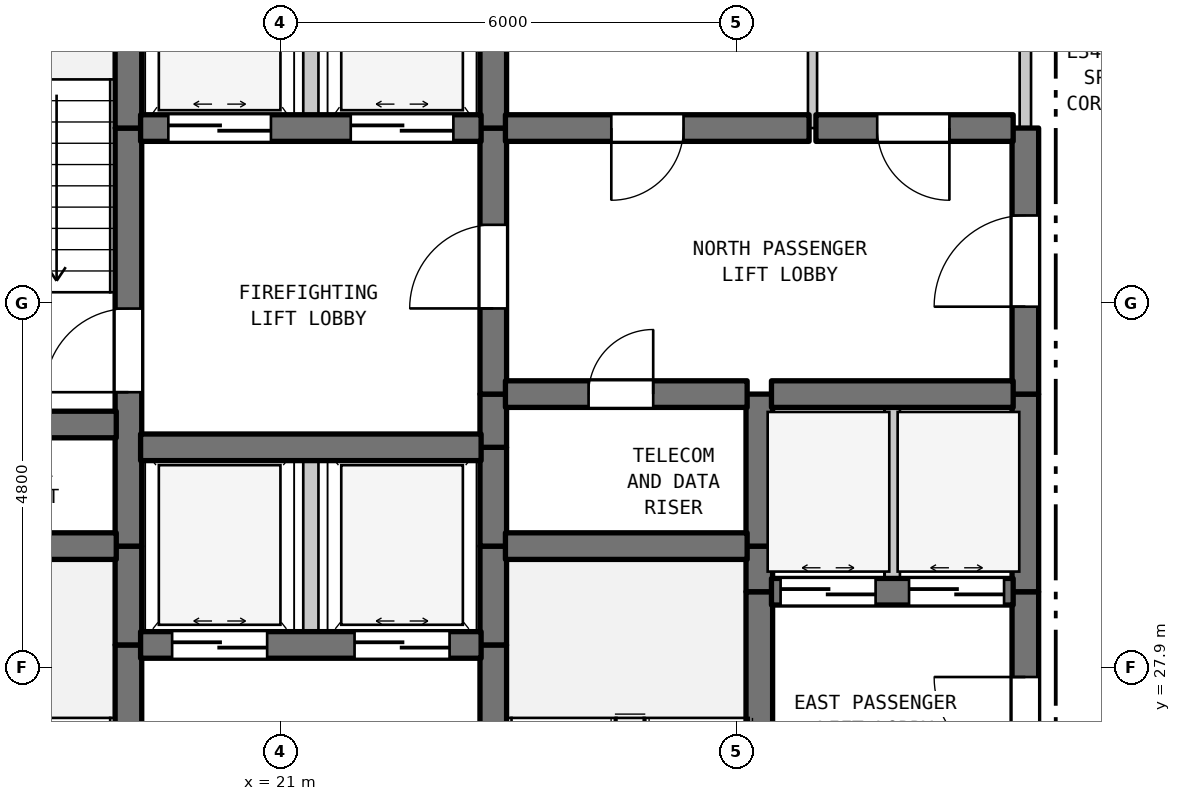
"""IFC4 building model, lengths in metres.
Left out: names, types, materials, properties, quantities, classifications, styles, units other than length and angle.
Written with IfcOpenShell. Run it as: python <this file> out.ifc"""

import sys

from ifc_helpers import new_model, si_unit, direction, frame, frame_2d, origin, place, context, subcontext, project, spatial, rectangle, extrude, element, fill, save


model = new_model("IFC4")
c1 = context("Model", 3, precision=1e-05, world=origin(), true_north=direction((0.0, 1.0)))
c2 = subcontext(c1, "Body", "Model", "MODEL_VIEW")
j1 = project(units=[si_unit("LENGTHUNIT", "METRE"), si_unit("PLANEANGLEUNIT", "RADIAN")], contexts=[c1])
p1 = place(None, origin())
s1 = spatial("IfcSite", under=j1, at=p1, CompositionType="ELEMENT")
p2 = place(p1, origin())
s2 = spatial("IfcBuilding", under=s1, at=p2, CompositionType="ELEMENT")
p3 = place(p2, frame((0.0, 0.0, 140.9)))
s3 = spatial("IfcBuildingStorey", under=s2, at=p3, CompositionType="ELEMENT", Elevation=140.9)
p4 = place(p3, frame((19.0, 22.7, 0.0), z_axis=(0.0, 0.0, 1.0), x_axis=(0.0, 1.0, 0.0)))
e1 = element("IfcWall", 1, at=p4, inside=s3, PredefinedType="SHEAR", context=c2, shape_type="SweptSolid", body=[
    extrude(rectangle(XDim=5.5, YDim=0.35, at=frame_2d((2.75, 0.0))), origin(), (0.0, 0.0, 1.0), 3.385),
])
p5 = place(p4, frame((0.631, 0.0, 0.0)))
e2 = element("IfcOpeningElement", 2, at=p5, cuts=e1, PredefinedType="OPENING", context=c2, shape_type="SweptSolid", body=[
    extrude(rectangle(XDim=1.1, YDim=2.15, at=frame_2d((0.55, 1.075))), frame((0.0, 0.185, 0.0), z_axis=(0.0, -1.0, 0.0), x_axis=(1.0, 0.0, 0.0)), (0.0, 0.0, 1.0), 0.37),
])
p6 = place(p3, frame((19.0, 28.2, 0.0), z_axis=(0.0, 0.0, 1.0), x_axis=(0.0, 1.0, 0.0)))
e3 = element("IfcWall", 3, at=p6, inside=s3, PredefinedType="SHEAR", context=c2, shape_type="SweptSolid", body=[
    extrude(rectangle(XDim=1.3, YDim=0.35, at=frame_2d((0.65, 0.0))), origin(), (0.0, 0.0, 1.0), 3.385),
])
p7 = place(p3, frame((19.0, 29.5, 0.0), z_axis=(0.0, 0.0, 1.0), x_axis=(0.0, 1.0, 0.0)))
e4 = element("IfcWall", 4, at=p7, inside=s3, PredefinedType="SHEAR", context=c2, shape_type="SweptSolid", body=[
    extrude(rectangle(XDim=5.5, YDim=0.35, at=frame_2d((2.75, 0.0))), origin(), (0.0, 0.0, 1.0), 3.385),
])
p8 = place(p7, frame((2.025, 0.0, 0.0)))
e5 = element("IfcOpeningElement", 5, at=p8, cuts=e4, PredefinedType="OPENING", context=c2, shape_type="SweptSolid", body=[
    extrude(rectangle(XDim=1.1, YDim=2.15, at=frame_2d((0.55, 1.075))), frame((0.0, 0.185, 0.0), z_axis=(0.0, -1.0, 0.0), x_axis=(1.0, 0.0, 0.0)), (0.0, 0.0, 1.0), 0.37),
])
p9 = place(p3, frame((19.0, 35.0, 0.0), z_axis=(0.0, 0.0, 1.0), x_axis=(0.0, 1.0, 0.0)))
e6 = element("IfcWall", 6, at=p9, inside=s3, PredefinedType="SHEAR", context=c2, shape_type="SweptSolid", body=[
    extrude(rectangle(XDim=2.9, YDim=0.35, at=frame_2d((1.45, 0.0))), origin(), (0.0, 0.0, 1.0), 3.385),
])
p10 = place(p3, frame((21.4, 28.2, 0.0), z_axis=(0.0, 0.0, 1.0), x_axis=(0.0, 1.0, 0.0)))
e7 = element("IfcWall", 7, at=p10, inside=s3, PredefinedType="STANDARD", context=c2, shape_type="SweptSolid", body=[
    extrude(rectangle(XDim=2.6, YDim=0.2, at=frame_2d((1.3, 0.0))), origin(), (0.0, 0.0, 1.0), 3.385),
])
p11 = place(p3, frame((21.4, 35.0, 0.0), z_axis=(0.0, 0.0, 1.0), x_axis=(0.0, 1.0, 0.0)))
e8 = element("IfcWall", 8, at=p11, inside=s3, PredefinedType="STANDARD", context=c2, shape_type="SweptSolid", body=[
    extrude(rectangle(XDim=2.9, YDim=0.2, at=frame_2d((1.45, 0.0))), origin(), (0.0, 0.0, 1.0), 3.385),
])
p12 = place(p3, frame((23.8, 22.7, 0.0), z_axis=(0.0, 0.0, 1.0), x_axis=(0.0, 1.0, 0.0)))
e9 = element("IfcWall", 9, at=p12, inside=s3, PredefinedType="SHEAR", context=c2, shape_type="SweptSolid", body=[
    extrude(rectangle(XDim=5.5, YDim=0.35, at=frame_2d((2.75, 0.0))), origin(), (0.0, 0.0, 1.0), 3.385),
])
p13 = place(p12, frame((0.235, 0.0, 0.0)))
e10 = element("IfcOpeningElement", 10, at=p13, cuts=e9, PredefinedType="OPENING", context=c2, shape_type="SweptSolid", body=[
    extrude(rectangle(XDim=1.1, YDim=2.15, at=frame_2d((0.55, 1.075))), frame((0.0, 0.185, 0.0), z_axis=(0.0, -1.0, 0.0), x_axis=(1.0, 0.0, 0.0)), (0.0, 0.0, 1.0), 0.37),
])
for number, where, z_axis, x_axis in (
    (11, (23.8, 28.2, 0.0), (0.0, 0.0, 1.0), (0.0, 1.0, 0.0)),
    (12, (23.8, 29.5, 0.0), (0.0, 0.0, 1.0), (0.0, 1.0, 0.0)),
):
    element("IfcWall", number, at=place(p3, frame(where, z_axis=z_axis, x_axis=x_axis)), inside=s3, PredefinedType="SHEAR", context=c2, shape_type="SweptSolid", body=[
        extrude(rectangle(XDim=1.3, YDim=0.35, at=frame_2d((0.65, 0.0))), origin(), (0.0, 0.0, 1.0), 3.385),
    ])
p14 = place(p3, frame((23.8, 30.8, 0.0), z_axis=(0.0, 0.0, 1.0), x_axis=(0.0, 1.0, 0.0)))
e13 = element("IfcWall", 13, at=p14, inside=s3, PredefinedType="SHEAR", context=c2, shape_type="SweptSolid", body=[
    extrude(rectangle(XDim=0.7, YDim=0.35, at=frame_2d((0.35, 0.0))), origin(), (0.0, 0.0, 1.0), 3.385),
])
p15 = place(p3, frame((23.8, 31.5, 0.0), z_axis=(0.0, 0.0, 1.0), x_axis=(0.0, 1.0, 0.0)))
e14 = element("IfcWall", 14, at=p15, inside=s3, PredefinedType="SHEAR", context=c2, shape_type="SweptSolid", body=[
    extrude(rectangle(XDim=3.5, YDim=0.35, at=frame_2d((1.75, 0.0))), origin(), (0.0, 0.0, 1.0), 3.385),
])
p16 = place(p15, frame((1.127, 0.0, 0.0)))
e15 = element("IfcOpeningElement", 15, at=p16, cuts=e14, PredefinedType="OPENING", context=c2, shape_type="SweptSolid", body=[
    extrude(rectangle(XDim=1.1, YDim=2.15, at=frame_2d((0.55, 1.075))), frame((0.0, 0.185, 0.0), z_axis=(0.0, -1.0, 0.0), x_axis=(1.0, 0.0, 0.0)), (0.0, 0.0, 1.0), 0.37),
])
p17 = place(p3, frame((23.8, 35.0, 0.0), z_axis=(0.0, 0.0, 1.0), x_axis=(0.0, 1.0, 0.0)))
e16 = element("IfcWall", 16, at=p17, inside=s3, PredefinedType="SHEAR", context=c2, shape_type="SweptSolid", body=[
    extrude(rectangle(XDim=2.9, YDim=0.35, at=frame_2d((1.45, 0.0))), origin(), (0.0, 0.0, 1.0), 3.385),
])
p18 = place(p3, frame((27.3, 25.6, 0.0), z_axis=(0.0, 0.0, 1.0), x_axis=(0.0, 1.0, 0.0)))
e17 = element("IfcWall", 17, at=p18, inside=s3, PredefinedType="SHEAR", context=c2, shape_type="SweptSolid", body=[
    extrude(rectangle(XDim=3.3, YDim=0.35, at=frame_2d((1.65, 0.0))), origin(), (0.0, 0.0, 1.0), 3.385),
])
p19 = place(p3, frame((27.3, 28.9, 0.0), z_axis=(0.0, 0.0, 1.0), x_axis=(0.0, 1.0, 0.0)))
e18 = element("IfcWall", 18, at=p19, inside=s3, PredefinedType="SHEAR", context=c2, shape_type="SweptSolid", body=[
    extrude(rectangle(XDim=0.6, YDim=0.35, at=frame_2d((0.3, 0.0))), origin(), (0.0, 0.0, 1.0), 3.385),
])
p20 = place(p3, frame((27.3, 29.5, 0.0), z_axis=(0.0, 0.0, 1.0), x_axis=(0.0, 1.0, 0.0)))
e19 = element("IfcWall", 19, at=p20, inside=s3, PredefinedType="SHEAR", context=c2, shape_type="SweptSolid", body=[
    extrude(rectangle(XDim=2.0, YDim=0.35, at=frame_2d((1.0, 0.0))), origin(), (0.0, 0.0, 1.0), 3.385),
])
p21 = place(p3, frame((28.0, 35.0, 0.0), z_axis=(0.0, 0.0, 1.0), x_axis=(0.0, 1.0, 0.0)))
e20 = element("IfcWall", 20, at=p21, inside=s3, PredefinedType="PARTITIONING", context=c2, shape_type="SweptSolid", body=[
    extrude(rectangle(XDim=2.9, YDim=0.12, at=frame_2d((1.45, 0.0))), origin(), (0.0, 0.0, 1.0), 3.385),
])
p22 = place(p3, frame((29.05, 28.9, 0.0), z_axis=(0.0, 0.0, 1.0), x_axis=(0.0, 1.0, 0.0)))
e21 = element("IfcWall", 21, at=p22, inside=s3, PredefinedType="STANDARD", context=c2, shape_type="SweptSolid", body=[
    extrude(rectangle(XDim=2.6, YDim=0.2, at=frame_2d((1.3, 0.0))), origin(), (0.0, 0.0, 1.0), 3.385),
])
p23 = place(p3, frame((30.8, 25.6, 0.0), z_axis=(0.0, 0.0, 1.0), x_axis=(0.0, 1.0, 0.0)))
e22 = element("IfcWall", 22, at=p23, inside=s3, PredefinedType="SHEAR", context=c2, shape_type="SweptSolid", body=[
    extrude(rectangle(XDim=3.3, YDim=0.35, at=frame_2d((1.65, 0.0))), origin(), (0.0, 0.0, 1.0), 3.385),
])
p24 = place(p23, frame((0.978, 0.0, 0.0)))
e23 = element("IfcOpeningElement", 23, at=p24, cuts=e22, PredefinedType="OPENING", context=c2, shape_type="SweptSolid", body=[
    extrude(rectangle(XDim=1.2, YDim=2.2, at=frame_2d((0.6, 1.1))), frame((0.0, 0.185, 0.0), z_axis=(0.0, -1.0, 0.0), x_axis=(1.0, 0.0, 0.0)), (0.0, 0.0, 1.0), 0.37),
])
p25 = place(p3, frame((30.8, 28.9, 0.0), z_axis=(0.0, 0.0, 1.0), x_axis=(0.0, 1.0, 0.0)))
e24 = element("IfcWall", 24, at=p25, inside=s3, PredefinedType="SHEAR", context=c2, shape_type="SweptSolid", body=[
    extrude(rectangle(XDim=2.6, YDim=0.35, at=frame_2d((1.3, 0.0))), origin(), (0.0, 0.0, 1.0), 3.385),
])
p26 = place(p3, frame((30.8, 31.5, 0.0), z_axis=(0.0, 0.0, 1.0), x_axis=(0.0, 1.0, 0.0)))
e25 = element("IfcWall", 25, at=p26, inside=s3, PredefinedType="SHEAR", context=c2, shape_type="SweptSolid", body=[
    extrude(rectangle(XDim=3.5, YDim=0.35, at=frame_2d((1.75, 0.0))), origin(), (0.0, 0.0, 1.0), 3.385),
])
p27 = place(p26, frame((1.15, 0.0, 0.0)))
e26 = element("IfcOpeningElement", 26, at=p27, cuts=e25, PredefinedType="OPENING", context=c2, shape_type="SweptSolid", body=[
    extrude(rectangle(XDim=1.2, YDim=2.2, at=frame_2d((0.6, 1.1))), frame((0.0, 0.185, 0.0), z_axis=(0.0, -1.0, 0.0), x_axis=(1.0, 0.0, 0.0)), (0.0, 0.0, 1.0), 0.37),
])
p28 = place(p3, frame((30.8, 35.0, 0.0), z_axis=(0.0, 0.0, 1.0), x_axis=(0.0, 1.0, 0.0)))
e27 = element("IfcWall", 27, at=p28, inside=s3, PredefinedType="STANDARD", context=c2, shape_type="SweptSolid", body=[
    extrude(rectangle(XDim=2.9, YDim=0.15, at=frame_2d((1.45, 0.0))), origin(), (0.0, 0.0, 1.0), 3.385),
])
p29 = place(p3, frame((19.16, 28.2, 0.0), z_axis=(0.0, 0.0, 1.0), x_axis=(1.0, 0.0, 0.0)))
e28 = element("IfcWall", 28, at=p29, inside=s3, PredefinedType="SHEAR", context=c2, shape_type="SweptSolid", body=[
    extrude(rectangle(XDim=4.48, YDim=0.35, at=frame_2d((2.24, 0.0))), origin(), (0.0, 0.0, 1.0), 3.385),
])
p30 = place(p29, frame((0.415, 0.0, 0.0)))
e29 = element("IfcOpeningElement", 29, at=p30, cuts=e28, PredefinedType="OPENING", context=c2, shape_type="SweptSolid", body=[
    extrude(rectangle(XDim=1.25, YDim=2.2, at=frame_2d((0.625, 1.1))), frame((0.0, 0.185, 0.0), z_axis=(0.0, -1.0, 0.0), x_axis=(1.0, 0.0, 0.0)), (0.0, 0.0, 1.0), 0.37),
])
p31 = place(p29, frame((2.815, 0.0, 0.0)))
e30 = element("IfcOpeningElement", 30, at=p31, cuts=e28, PredefinedType="OPENING", context=c2, shape_type="SweptSolid", body=[
    extrude(rectangle(XDim=1.25, YDim=2.2, at=frame_2d((0.625, 1.1))), frame((0.0, 0.185, 0.0), z_axis=(0.0, -1.0, 0.0), x_axis=(1.0, 0.0, 0.0)), (0.0, 0.0, 1.0), 0.37),
])
p32 = place(p3, frame((27.46, 28.9, 0.0), z_axis=(0.0, 0.0, 1.0), x_axis=(1.0, 0.0, 0.0)))
e31 = element("IfcWall", 31, at=p32, inside=s3, PredefinedType="SHEAR", context=c2, shape_type="SweptSolid", body=[
    extrude(rectangle(XDim=3.18, YDim=0.35, at=frame_2d((1.59, 0.0))), origin(), (0.0, 0.0, 1.0), 3.385),
])
p33 = place(p32, frame((0.12, 0.0, 0.0)))
e32 = element("IfcOpeningElement", 32, at=p33, cuts=e31, PredefinedType="OPENING", context=c2, shape_type="SweptSolid", body=[
    extrude(rectangle(XDim=1.25, YDim=2.2, at=frame_2d((0.625, 1.1))), frame((0.0, 0.185, 0.0), z_axis=(0.0, -1.0, 0.0), x_axis=(1.0, 0.0, 0.0)), (0.0, 0.0, 1.0), 0.37),
])
p34 = place(p32, frame((1.81, 0.0, 0.0)))
e33 = element("IfcOpeningElement", 33, at=p34, cuts=e31, PredefinedType="OPENING", context=c2, shape_type="SweptSolid", body=[
    extrude(rectangle(XDim=1.25, YDim=2.2, at=frame_2d((0.625, 1.1))), frame((0.0, 0.185, 0.0), z_axis=(0.0, -1.0, 0.0), x_axis=(1.0, 0.0, 0.0)), (0.0, 0.0, 1.0), 0.37),
])
p35 = place(p3, frame((15.16, 29.5, 0.0), z_axis=(0.0, 0.0, 1.0), x_axis=(1.0, 0.0, 0.0)))
e34 = element("IfcWall", 34, at=p35, inside=s3, PredefinedType="SHEAR", context=c2, shape_type="SweptSolid", body=[
    extrude(rectangle(XDim=3.68, YDim=0.35, at=frame_2d((1.84, 0.0))), origin(), (0.0, 0.0, 1.0), 3.385),
])
p36 = place(p3, frame((23.96, 29.5, 0.0), z_axis=(0.0, 0.0, 1.0), x_axis=(1.0, 0.0, 0.0)))
e35 = element("IfcWall", 35, at=p36, inside=s3, PredefinedType="SHEAR", context=c2, shape_type="SweptSolid", body=[
    extrude(rectangle(XDim=3.18, YDim=0.35, at=frame_2d((1.59, 0.0))), origin(), (0.0, 0.0, 1.0), 3.385),
])
p37 = place(p3, frame((19.16, 30.8, 0.0), z_axis=(0.0, 0.0, 1.0), x_axis=(1.0, 0.0, 0.0)))
e36 = element("IfcWall", 36, at=p37, inside=s3, PredefinedType="SHEAR", context=c2, shape_type="SweptSolid", body=[
    extrude(rectangle(XDim=4.48, YDim=0.35, at=frame_2d((2.24, 0.0))), origin(), (0.0, 0.0, 1.0), 3.385),
])
p38 = place(p3, frame((15.16, 31.1, 0.0), z_axis=(0.0, 0.0, 1.0), x_axis=(1.0, 0.0, 0.0)))
e37 = element("IfcWall", 37, at=p38, inside=s3, PredefinedType="SHEAR", context=c2, shape_type="SweptSolid", body=[
    extrude(rectangle(XDim=3.68, YDim=0.35, at=frame_2d((1.84, 0.0))), origin(), (0.0, 0.0, 1.0), 3.385),
])
p39 = place(p3, frame((23.96, 31.5, 0.0), z_axis=(0.0, 0.0, 1.0), x_axis=(1.0, 0.0, 0.0)))
e38 = element("IfcWall", 38, at=p39, inside=s3, PredefinedType="SHEAR", context=c2, shape_type="SweptSolid", body=[
    extrude(rectangle(XDim=3.18, YDim=0.35, at=frame_2d((1.59, 0.0))), origin(), (0.0, 0.0, 1.0), 3.385),
])
p40 = place(p39, frame((1.094, 0.0, 0.0)))
e39 = element("IfcOpeningElement", 39, at=p40, cuts=e38, PredefinedType="OPENING", context=c2, shape_type="SweptSolid", body=[
    extrude(rectangle(XDim=0.85, YDim=2.1, at=frame_2d((0.425, 1.05))), frame((0.0, 0.185, 0.0), z_axis=(0.0, -1.0, 0.0), x_axis=(1.0, 0.0, 0.0)), (0.0, 0.0, 1.0), 0.37),
])
p41 = place(p3, frame((27.46, 31.5, 0.0), z_axis=(0.0, 0.0, 1.0), x_axis=(1.0, 0.0, 0.0)))
e40 = element("IfcWall", 40, at=p41, inside=s3, PredefinedType="SHEAR", context=c2, shape_type="SweptSolid", body=[
    extrude(rectangle(XDim=3.18, YDim=0.35, at=frame_2d((1.59, 0.0))), origin(), (0.0, 0.0, 1.0), 3.385),
])
p42 = place(p3, frame((19.16, 35.0, 0.0), z_axis=(0.0, 0.0, 1.0), x_axis=(1.0, 0.0, 0.0)))
e41 = element("IfcWall", 41, at=p42, inside=s3, PredefinedType="SHEAR", context=c2, shape_type="SweptSolid", body=[
    extrude(rectangle(XDim=4.48, YDim=0.35, at=frame_2d((2.24, 0.0))), origin(), (0.0, 0.0, 1.0), 3.385),
])
p43 = place(p42, frame((0.365, 0.0, 0.0)))
e42 = element("IfcOpeningElement", 42, at=p43, cuts=e41, PredefinedType="OPENING", context=c2, shape_type="SweptSolid", body=[
    extrude(rectangle(XDim=1.35, YDim=2.2, at=frame_2d((0.675, 1.1))), frame((0.0, 0.185, 0.0), z_axis=(0.0, -1.0, 0.0), x_axis=(1.0, 0.0, 0.0)), (0.0, 0.0, 1.0), 0.37),
])
p44 = place(p42, frame((2.765, 0.0, 0.0)))
e43 = element("IfcOpeningElement", 43, at=p44, cuts=e41, PredefinedType="OPENING", context=c2, shape_type="SweptSolid", body=[
    extrude(rectangle(XDim=1.35, YDim=2.2, at=frame_2d((0.675, 1.1))), frame((0.0, 0.185, 0.0), z_axis=(0.0, -1.0, 0.0), x_axis=(1.0, 0.0, 0.0)), (0.0, 0.0, 1.0), 0.37),
])
p45 = place(p3, frame((23.96, 35.0, 0.0), z_axis=(0.0, 0.0, 1.0), x_axis=(1.0, 0.0, 0.0)))
e44 = element("IfcWall", 44, at=p45, inside=s3, PredefinedType="SHEAR", context=c2, shape_type="SweptSolid", body=[
    extrude(rectangle(XDim=3.995, YDim=0.35, at=frame_2d((1.998, 0.0))), origin(), (0.0, 0.0, 1.0), 3.385),
])
p46 = place(p45, frame((1.393, 0.0, 0.0)))
e45 = element("IfcOpeningElement", 45, at=p46, cuts=e44, PredefinedType="OPENING", context=c2, shape_type="SweptSolid", body=[
    extrude(rectangle(XDim=0.95, YDim=2.15, at=frame_2d((0.475, 1.075))), frame((0.0, 0.185, 0.0), z_axis=(0.0, -1.0, 0.0), x_axis=(1.0, 0.0, 0.0)), (0.0, 0.0, 1.0), 0.37),
])
p47 = place(p3, frame((28.045, 35.0, 0.0), z_axis=(0.0, 0.0, 1.0), x_axis=(1.0, 0.0, 0.0)))
e46 = element("IfcWall", 46, at=p47, inside=s3, PredefinedType="SHEAR", context=c2, shape_type="SweptSolid", body=[
    extrude(rectangle(XDim=2.595, YDim=0.35, at=frame_2d((1.297, 0.0))), origin(), (0.0, 0.0, 1.0), 3.385),
])
p48 = place(p47, frame((0.806, 0.0, 0.0)))
e47 = element("IfcOpeningElement", 47, at=p48, cuts=e46, PredefinedType="OPENING", context=c2, shape_type="SweptSolid", body=[
    extrude(rectangle(XDim=0.95, YDim=2.15, at=frame_2d((0.475, 1.075))), frame((0.0, 0.185, 0.0), z_axis=(0.0, -1.0, 0.0), x_axis=(1.0, 0.0, 0.0)), (0.0, 0.0, 1.0), 0.37),
])
p49 = place(p8, origin())
e48 = element("IfcDoor", 48, at=p49, inside=s3, OperationType="SINGLE_SWING_LEFT", PredefinedType="DOOR", context=c2, shape_type="SweptSolid", body=[
    extrude(rectangle(XDim=1.1, YDim=2.15, at=frame_2d((0.55, 1.075))), frame((0.0, 0.025, 0.0), z_axis=(0.0, -1.0, 0.0), x_axis=(1.0, 0.0, 0.0)), (0.0, 0.0, 1.0), 0.05),
])
fill(e5, e48)
p50 = place(p16, origin())
e49 = element("IfcDoor", 49, at=p50, inside=s3, OperationType="SINGLE_SWING_LEFT", PredefinedType="DOOR", context=c2, shape_type="SweptSolid", body=[
    extrude(rectangle(XDim=1.1, YDim=2.15, at=frame_2d((0.55, 1.075))), frame((0.0, 0.025, 0.0), z_axis=(0.0, -1.0, 0.0), x_axis=(1.0, 0.0, 0.0)), (0.0, 0.0, 1.0), 0.05),
])
fill(e15, e49)
p51 = place(p24, origin())
e50 = element("IfcDoor", 50, at=p51, inside=s3, OperationType="SINGLE_SWING_RIGHT", PredefinedType="DOOR", context=c2, shape_type="SweptSolid", body=[
    extrude(rectangle(XDim=1.2, YDim=2.2, at=frame_2d((0.6, 1.1))), frame((0.0, 0.025, 0.0), z_axis=(0.0, -1.0, 0.0), x_axis=(1.0, 0.0, 0.0)), (0.0, 0.0, 1.0), 0.05),
])
fill(e23, e50)
p52 = place(p27, origin())
e51 = element("IfcDoor", 51, at=p52, inside=s3, OperationType="SINGLE_SWING_LEFT", PredefinedType="DOOR", context=c2, shape_type="SweptSolid", body=[
    extrude(rectangle(XDim=1.2, YDim=2.2, at=frame_2d((0.6, 1.1))), frame((0.0, 0.025, 0.0), z_axis=(0.0, -1.0, 0.0), x_axis=(1.0, 0.0, 0.0)), (0.0, 0.0, 1.0), 0.05),
])
fill(e26, e51)
p53 = place(p30, origin())
e52 = element("IfcDoor", 52, at=p53, inside=s3, OperationType="DOUBLE_DOOR_SLIDING", PredefinedType="DOOR", context=c2, shape_type="SweptSolid", body=[
    extrude(rectangle(XDim=1.25, YDim=2.2, at=frame_2d((0.625, 1.1))), frame((0.0, 0.025, 0.0), z_axis=(0.0, -1.0, 0.0), x_axis=(1.0, 0.0, 0.0)), (0.0, 0.0, 1.0), 0.05),
])
fill(e29, e52)
p54 = place(p31, origin())
e53 = element("IfcDoor", 53, at=p54, inside=s3, OperationType="DOUBLE_DOOR_SLIDING", PredefinedType="DOOR", context=c2, shape_type="SweptSolid", body=[
    extrude(rectangle(XDim=1.25, YDim=2.2, at=frame_2d((0.625, 1.1))), frame((0.0, 0.025, 0.0), z_axis=(0.0, -1.0, 0.0), x_axis=(1.0, 0.0, 0.0)), (0.0, 0.0, 1.0), 0.05),
])
fill(e30, e53)
p55 = place(p33, origin())
e54 = element("IfcDoor", 54, at=p55, inside=s3, OperationType="DOUBLE_DOOR_SLIDING", PredefinedType="DOOR", context=c2, shape_type="SweptSolid", body=[
    extrude(rectangle(XDim=1.25, YDim=2.2, at=frame_2d((0.625, 1.1))), frame((0.0, 0.025, 0.0), z_axis=(0.0, -1.0, 0.0), x_axis=(1.0, 0.0, 0.0)), (0.0, 0.0, 1.0), 0.05),
])
fill(e32, e54)
p56 = place(p34, origin())
e55 = element("IfcDoor", 55, at=p56, inside=s3, OperationType="DOUBLE_DOOR_SLIDING", PredefinedType="DOOR", context=c2, shape_type="SweptSolid", body=[
    extrude(rectangle(XDim=1.25, YDim=2.2, at=frame_2d((0.625, 1.1))), frame((0.0, 0.025, 0.0), z_axis=(0.0, -1.0, 0.0), x_axis=(1.0, 0.0, 0.0)), (0.0, 0.0, 1.0), 0.05),
])
fill(e33, e55)
p57 = place(p40, origin())
e56 = element("IfcDoor", 56, at=p57, inside=s3, OperationType="SINGLE_SWING_RIGHT", PredefinedType="DOOR", context=c2, shape_type="SweptSolid", body=[
    extrude(rectangle(XDim=0.85, YDim=2.1, at=frame_2d((0.425, 1.05))), frame((0.0, 0.025, 0.0), z_axis=(0.0, -1.0, 0.0), x_axis=(1.0, 0.0, 0.0)), (0.0, 0.0, 1.0), 0.05),
])
fill(e39, e56)
p58 = place(p43, origin())
e57 = element("IfcDoor", 57, at=p58, inside=s3, OperationType="DOUBLE_DOOR_SLIDING", PredefinedType="DOOR", context=c2, shape_type="SweptSolid", body=[
    extrude(rectangle(XDim=1.35, YDim=2.2, at=frame_2d((0.675, 1.1))), frame((0.0, 0.025, 0.0), z_axis=(0.0, -1.0, 0.0), x_axis=(1.0, 0.0, 0.0)), (0.0, 0.0, 1.0), 0.05),
])
fill(e42, e57)
p59 = place(p44, origin())
e58 = element("IfcDoor", 58, at=p59, inside=s3, OperationType="DOUBLE_DOOR_SLIDING", PredefinedType="DOOR", context=c2, shape_type="SweptSolid", body=[
    extrude(rectangle(XDim=1.35, YDim=2.2, at=frame_2d((0.675, 1.1))), frame((0.0, 0.025, 0.0), z_axis=(0.0, -1.0, 0.0), x_axis=(1.0, 0.0, 0.0)), (0.0, 0.0, 1.0), 0.05),
])
fill(e43, e58)
p60 = place(p46, frame((0.95, 0.0, 0.0), z_axis=(0.0, 0.0, 1.0), x_axis=(-1.0, 0.0, 0.0)))
e59 = element("IfcDoor", 59, at=p60, inside=s3, OperationType="SINGLE_SWING_LEFT", PredefinedType="DOOR", context=c2, shape_type="SweptSolid", body=[
    extrude(rectangle(XDim=0.95, YDim=2.15, at=frame_2d((0.475, 1.075))), frame((0.0, 0.025, 0.0), z_axis=(0.0, -1.0, 0.0), x_axis=(1.0, 0.0, 0.0)), (0.0, 0.0, 1.0), 0.05),
])
fill(e45, e59)
p61 = place(p48, frame((0.95, 0.0, 0.0), z_axis=(0.0, 0.0, 1.0), x_axis=(-1.0, 0.0, 0.0)))
e60 = element("IfcDoor", 60, at=p61, inside=s3, OperationType="SINGLE_SWING_RIGHT", PredefinedType="DOOR", context=c2, shape_type="SweptSolid", body=[
    extrude(rectangle(XDim=0.95, YDim=2.15, at=frame_2d((0.475, 1.075))), frame((0.0, 0.025, 0.0), z_axis=(0.0, -1.0, 0.0), x_axis=(1.0, 0.0, 0.0)), (0.0, 0.0, 1.0), 0.05),
])
fill(e47, e60)
save(model, sys.argv[1])
